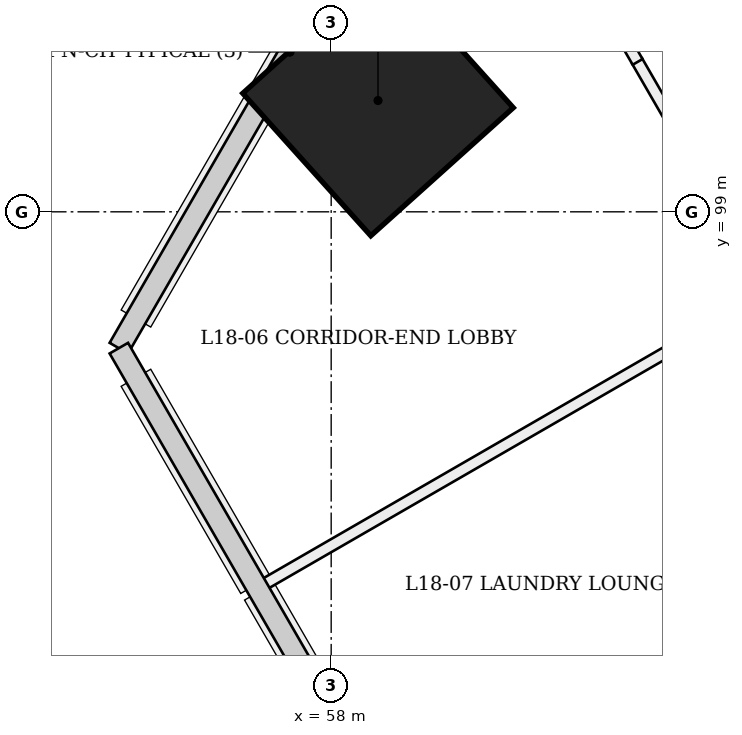
"""IFC4 building model, lengths in metres.
Left out: names, types, materials, properties, quantities, classifications, styles, units other than length and angle.
Written with IfcOpenShell. Run it as: python <this file> out.ifc"""

import sys

from ifc_helpers import new_model, si_unit, direction, frame, frame_2d, origin, origin_2d, place, context, subcontext, project, spatial, rectangle, extrude, element, save


model = new_model("IFC4")
c1 = context("Model", 3, precision=1e-05, world=origin(), true_north=direction((0.0, 1.0)))
c2 = subcontext(c1, "Body", "Model", "MODEL_VIEW")
j1 = project(units=[si_unit("LENGTHUNIT", "METRE"), si_unit("PLANEANGLEUNIT", "RADIAN")], contexts=[c1])
p1 = place(None, origin())
s1 = spatial("IfcSite", under=j1, at=p1, CompositionType="ELEMENT")
p2 = place(p1, origin())
s2 = spatial("IfcBuilding", under=s1, at=p2, CompositionType="ELEMENT")
p3 = place(p2, frame((0.0, 0.0, 73.8)))
s3 = spatial("IfcBuildingStorey", under=s2, at=p3, CompositionType="ELEMENT", Elevation=73.8)
p4 = place(p3, frame((58.582, 100.453, 0.0), z_axis=(0.028403721265, 0.009287135593, 0.999553389135), x_axis=(-0.866201868799, 0.499294814231, 0.019975258968)))
e1 = element("IfcColumn", 1, at=p4, inside=s3, PredefinedType="COLUMN", context=c2, shape_type="SweptSolid", body=[
    extrude(rectangle(XDim=2.52, YDim=2.52, at=origin_2d()), origin(), (0.0, 0.0, 1.0), 3.602),
])
p5 = place(p3, frame((62.844, 99.565, 0.0), z_axis=(0.0, 0.0, 1.0), x_axis=(-0.50001794124, 0.866015045157, 0.0)))
e2 = element("IfcWall", 2, at=p5, inside=s3, PredefinedType="PARTITIONING", context=c2, shape_type="SweptSolid", body=[
    extrude(rectangle(XDim=1.645, YDim=0.15, at=frame_2d((0.823, 0.0))), origin(), (0.0, 0.0, 1.0), 3.1),
])
p6 = place(p3, frame((60.226, 104.1, 0.0), z_axis=(0.0, 0.0, 1.0), x_axis=(0.499999409447, -0.86602574474, 0.0)))
e3 = element("IfcWall", 3, at=p6, inside=s3, PredefinedType="PARTITIONING", context=c2, shape_type="SweptSolid", body=[
    extrude(rectangle(XDim=3.612, YDim=0.15, at=frame_2d((1.806, 0.0))), origin(), (0.0, 0.0, 1.0), 2.6),
])
p7 = place(p3, frame((57.099, 94.088, 0.0), z_axis=(0.0, 0.0, 1.0), x_axis=(0.866030443922, 0.499991270124, 0.0)))
e4 = element("IfcWall", 4, at=p7, inside=s3, PredefinedType="PARTITIONING", context=c2, shape_type="SweptSolid", body=[
    extrude(rectangle(XDim=6.237, YDim=0.15, at=frame_2d((3.118, 0.0))), origin(), (0.0, 0.0, 1.0), 2.6),
])
p8 = place(p3, frame((58.922, 90.929, 0.0), z_axis=(0.0, 0.0, 1.0), x_axis=(0.866025401434, 0.500000004071, 0.0)))
e5 = element("IfcWall", 5, at=p8, inside=s3, PredefinedType="PARTITIONING", context=c2, shape_type="SweptSolid", body=[
    extrude(rectangle(XDim=6.345, YDim=0.1, at=frame_2d((3.173, 0.0))), origin(), (0.0, 0.0, 1.0), 2.6),
])
save(model, sys.argv[1])
